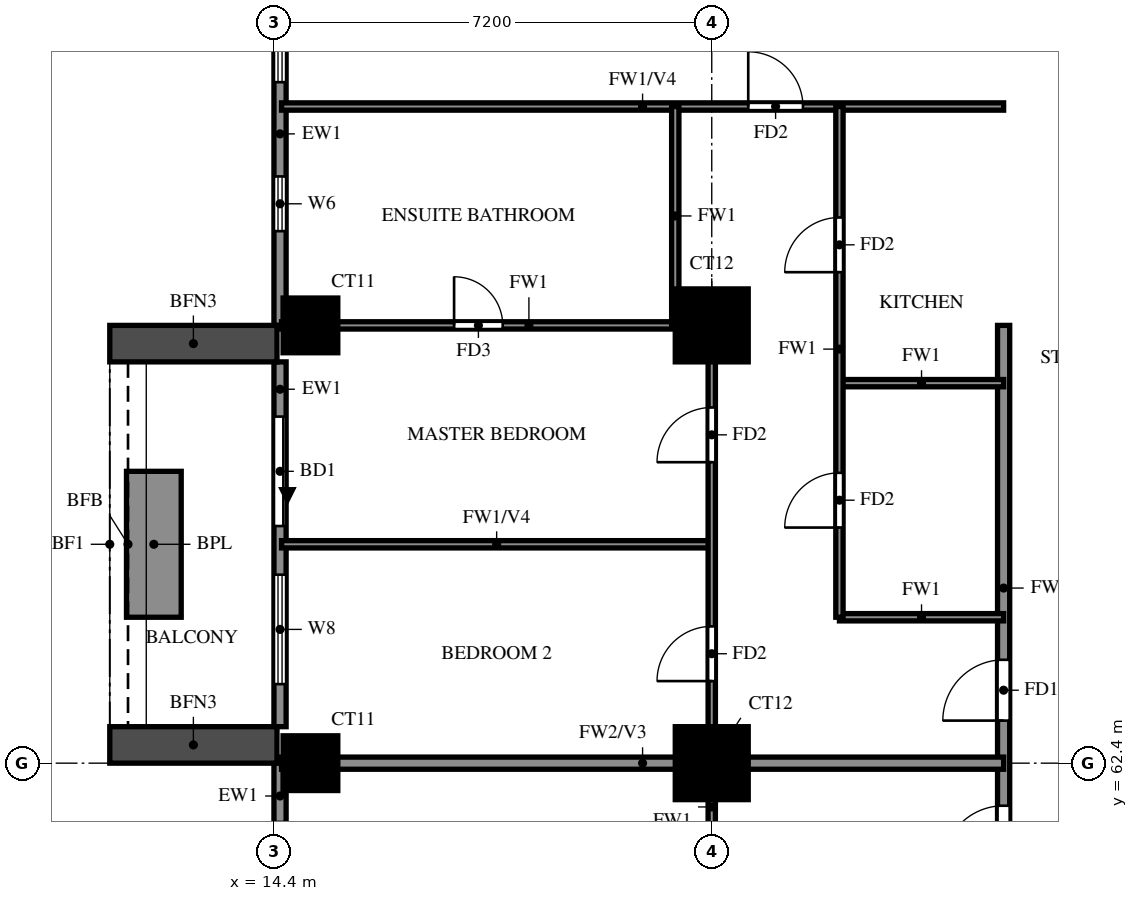
"""IFC4 building model, lengths in metres.
Left out: names, types, materials, properties, quantities, classifications, styles, units other than length and angle.
Written with IfcOpenShell. Run it as: python <this file> out.ifc"""

import sys

from ifc_helpers import new_model, si_unit, direction, frame, frame_2d, origin, origin_2d, place, context, subcontext, project, spatial, rectangle, extrude, source, transform, mapped, element, fill, save


model = new_model("IFC4")
c1 = context("Model", 3, precision=1e-05, world=origin(), true_north=direction((0.0, 1.0)))
c2 = subcontext(c1, "Body", "Model", "MODEL_VIEW")
j1 = project(units=[si_unit("LENGTHUNIT", "METRE"), si_unit("PLANEANGLEUNIT", "RADIAN")], contexts=[c1])
p1 = place(None, origin())
s1 = spatial("IfcSite", under=j1, at=p1, CompositionType="ELEMENT")
p2 = place(p1, origin())
s2 = spatial("IfcBuilding", under=s1, at=p2, CompositionType="ELEMENT")
p3 = place(p2, frame((0.0, 0.0, 100.5)))
s3 = spatial("IfcBuildingStorey", under=s2, at=p3, CompositionType="ELEMENT", Elevation=100.5)
m1 = source(origin(), c2, "Body", "SweptSolid", [
    extrude(rectangle(XDim=0.9, YDim=0.9, at=origin_2d()), origin(), (0.0, 0.0, 1.0), 3.18),
])
p4 = place(p3, frame((15.0, 62.4, 0.0), z_axis=(0.0, 0.0, 1.0), x_axis=(1.0, 0.0, 0.0)))
e1 = element("IfcColumn", 1, at=p4, inside=s3, PredefinedType="COLUMN", context=c2, shape_type="MappedRepresentation", body=[
    mapped(m1, transform((0.0, 0.0, 0.0))),
])
m2 = source(origin(), c2, "Body", "SweptSolid", [
    extrude(rectangle(XDim=1.2, YDim=1.2, at=origin_2d()), origin(), (0.0, 0.0, 1.0), 3.18),
])
p5 = place(p3, frame((21.6, 62.4, 0.0), z_axis=(0.0, 0.0, 1.0), x_axis=(1.0, 0.0, 0.0)))
e2 = element("IfcColumn", 2, at=p5, inside=s3, PredefinedType="COLUMN", context=c2, shape_type="MappedRepresentation", body=[
    mapped(m2, transform((0.0, 0.0, 0.0))),
])
p6 = place(p3, frame((15.0, 69.6, 0.0), z_axis=(0.0, 0.0, 1.0), x_axis=(1.0, 0.0, 0.0)))
e3 = element("IfcColumn", 3, at=p6, inside=s3, PredefinedType="COLUMN", context=c2, shape_type="MappedRepresentation", body=[
    mapped(m1, transform((0.0, 0.0, 0.0))),
])
p7 = place(p3, frame((21.6, 69.6, 0.0), z_axis=(0.0, 0.0, 1.0), x_axis=(1.0, 0.0, 0.0)))
e4 = element("IfcColumn", 4, at=p7, inside=s3, PredefinedType="COLUMN", context=c2, shape_type="MappedRepresentation", body=[
    mapped(m2, transform((0.0, 0.0, 0.0))),
])
p8 = place(p3, frame((14.5, 76.6, 0.0), z_axis=(0.0, 0.0, 1.0), x_axis=(0.0, -1.0, 0.0)))
e5 = element("IfcWall", 5, at=p8, inside=s3, PredefinedType="SOLIDWALL", context=c2, shape_type="SweptSolid", body=[
    extrude(rectangle(XDim=7.0, YDim=0.2, at=frame_2d((3.5, 0.0))), origin(), (0.0, 0.0, 1.0), 3.18),
])
p9 = place(p8, frame((4.55, 0.0, 1.5)))
e6 = element("IfcOpeningElement", 6, at=p9, cuts=e5, PredefinedType="OPENING", context=c2, shape_type="SweptSolid", body=[
    extrude(rectangle(XDim=0.9, YDim=0.9, at=frame_2d((0.45, 0.45))), frame((0.0, 0.11, 0.0), z_axis=(0.0, -1.0, 0.0), x_axis=(1.0, 0.0, 0.0)), (0.0, 0.0, 1.0), 0.22),
])
p10 = place(p8, frame((0.6, 0.0, 0.6)))
e7 = element("IfcOpeningElement", 7, at=p10, cuts=e5, PredefinedType="OPENING", context=c2, shape_type="SweptSolid", body=[
    extrude(rectangle(XDim=2.4, YDim=2.4, at=frame_2d((1.2, 1.2))), frame((0.0, 0.11, 0.0), z_axis=(0.0, -1.0, 0.0), x_axis=(1.0, 0.0, 0.0)), (0.0, 0.0, 1.0), 0.22),
])
p11 = place(p3, frame((14.5, 69.0, 0.0), z_axis=(0.0, 0.0, 1.0), x_axis=(0.0, -1.0, 0.0)))
e8 = element("IfcWall", 8, at=p11, inside=s3, PredefinedType="SOLIDWALL", context=c2, shape_type="SweptSolid", body=[
    extrude(rectangle(XDim=6.0, YDim=0.2, at=frame_2d((3.0, 0.0))), origin(), (0.0, 0.0, 1.0), 3.18),
])
p12 = place(p11, frame((0.9, 0.0, 0.0)))
e9 = element("IfcOpeningElement", 9, at=p12, cuts=e8, PredefinedType="OPENING", context=c2, shape_type="SweptSolid", body=[
    extrude(rectangle(XDim=1.8, YDim=2.4, at=frame_2d((0.9, 1.2))), frame((0.0, 0.11, 0.0), z_axis=(0.0, -1.0, 0.0), x_axis=(1.0, 0.0, 0.0)), (0.0, 0.0, 1.0), 0.22),
])
p13 = place(p11, frame((3.5, 0.0, 0.6)))
e10 = element("IfcOpeningElement", 10, at=p13, cuts=e8, PredefinedType="OPENING", context=c2, shape_type="SweptSolid", body=[
    extrude(rectangle(XDim=1.8, YDim=2.4, at=frame_2d((0.9, 1.2))), frame((0.0, 0.11, 0.0), z_axis=(0.0, -1.0, 0.0), x_axis=(1.0, 0.0, 0.0)), (0.0, 0.0, 1.0), 0.22),
])
p14 = place(p3, frame((14.5, 62.4, 0.0), z_axis=(0.0, 0.0, 1.0), x_axis=(0.0, -1.0, 0.0)))
e11 = element("IfcWall", 11, at=p14, inside=s3, PredefinedType="SOLIDWALL", context=c2, shape_type="SweptSolid", body=[
    extrude(rectangle(XDim=7.2, YDim=0.2, at=frame_2d((3.6, 0.0))), origin(), (0.0, 0.0, 1.0), 3.18),
])
p15 = place(p14, frame((0.967, 0.0, 0.6)))
e12 = element("IfcOpeningElement", 12, at=p15, cuts=e11, PredefinedType="OPENING", context=c2, shape_type="SweptSolid", body=[
    extrude(rectangle(XDim=2.4, YDim=2.4, at=frame_2d((1.2, 1.2))), frame((0.0, 0.11, 0.0), z_axis=(0.0, -1.0, 0.0), x_axis=(1.0, 0.0, 0.0)), (0.0, 0.0, 1.0), 0.22),
])
p16 = place(p14, frame((3.833, 0.0, 0.6)))
e13 = element("IfcOpeningElement", 13, at=p16, cuts=e11, PredefinedType="OPENING", context=c2, shape_type="SweptSolid", body=[
    extrude(rectangle(XDim=2.4, YDim=2.4, at=frame_2d((1.2, 1.2))), frame((0.0, 0.11, 0.0), z_axis=(0.0, -1.0, 0.0), x_axis=(1.0, 0.0, 0.0)), (0.0, 0.0, 1.0), 0.22),
])
for number, where, z_axis, x_axis in (
    (14, (14.45, 69.3, 0.0), (0.0, 0.0, 1.0), (-1.0, 0.0, 0.0)),
    (15, (14.45, 62.7, 0.0), (0.0, 0.0, 1.0), (-1.0, 0.0, 0.0)),
):
    element("IfcWall", number, at=place(p3, frame(where, z_axis=z_axis, x_axis=x_axis)), inside=s3, PredefinedType="SOLIDWALL", context=c2, shape_type="SweptSolid", body=[
        extrude(rectangle(XDim=2.75, YDim=0.6, at=frame_2d((1.375, 0.0))), origin(), (0.0, 0.0, 1.0), 2.85),
    ])
p17 = place(p3, frame((12.425, 67.2, 0.0), z_axis=(0.0, 0.0, 1.0), x_axis=(0.0, -1.0, 0.0)))
e16 = element("IfcWall", 16, at=p17, inside=s3, PredefinedType="SOLIDWALL", context=c2, shape_type="SweptSolid", body=[
    extrude(rectangle(XDim=2.4, YDim=0.9, at=frame_2d((1.2, 0.0))), origin(), (0.0, 0.0, 1.0), 0.9),
])
p18 = place(p3, frame((26.4, 60.0, 0.0), z_axis=(0.0, 0.0, 1.0), x_axis=(0.0, 1.0, 0.0)))
e17 = element("IfcWall", 17, at=p18, inside=s3, PredefinedType="SOLIDWALL", context=c2, shape_type="SweptSolid", body=[
    extrude(rectangle(XDim=9.6, YDim=0.2, at=frame_2d((4.8, 0.0))), origin(), (0.0, 0.0, 1.0), 3.18),
])
p19 = place(p18, frame((0.7, 0.0, 0.0)))
e18 = element("IfcOpeningElement", 18, at=p19, cuts=e17, PredefinedType="OPENING", context=c2, shape_type="SweptSolid", body=[
    extrude(rectangle(XDim=1.0, YDim=2.1, at=frame_2d((0.5, 1.05))), frame((0.0, 0.11, 0.0), z_axis=(0.0, -1.0, 0.0), x_axis=(1.0, 0.0, 0.0)), (0.0, 0.0, 1.0), 0.22),
])
p20 = place(p18, frame((3.1, 0.0, 0.0)))
e19 = element("IfcOpeningElement", 19, at=p20, cuts=e17, PredefinedType="OPENING", context=c2, shape_type="SweptSolid", body=[
    extrude(rectangle(XDim=1.0, YDim=2.1, at=frame_2d((0.5, 1.05))), frame((0.0, 0.11, 0.0), z_axis=(0.0, -1.0, 0.0), x_axis=(1.0, 0.0, 0.0)), (0.0, 0.0, 1.0), 0.22),
])
p21 = place(p3, frame((14.525, 62.4, 0.0), z_axis=(0.0, 0.0, 1.0), x_axis=(1.0, 0.0, 0.0)))
e20 = element("IfcWall", 20, at=p21, inside=s3, PredefinedType="SOLIDWALL", context=c2, shape_type="SweptSolid", body=[
    extrude(rectangle(XDim=11.875, YDim=0.2, at=frame_2d((5.938, 0.0))), origin(), (0.0, 0.0, 1.0), 3.18),
])
p22 = place(p3, frame((23.7, 64.8, 0.0), z_axis=(0.0, 0.0, 1.0), x_axis=(1.0, 0.0, 0.0)))
e21 = element("IfcWall", 21, at=p22, inside=s3, PredefinedType="PARTITIONING", context=c2, shape_type="SweptSolid", body=[
    extrude(rectangle(XDim=2.7, YDim=0.12, at=frame_2d((1.35, 0.0))), origin(), (0.0, 0.0, 1.0), 3.18),
])
p23 = place(p3, frame((14.525, 66.0, 0.0), z_axis=(0.0, 0.0, 1.0), x_axis=(1.0, 0.0, 0.0)))
e22 = element("IfcWall", 22, at=p23, inside=s3, PredefinedType="PARTITIONING", context=c2, shape_type="SweptSolid", body=[
    extrude(rectangle(XDim=7.075, YDim=0.12, at=frame_2d((3.538, 0.0))), origin(), (0.0, 0.0, 1.0), 2.28),
])
p24 = place(p3, frame((23.7, 68.65, 0.0), z_axis=(0.0, 0.0, 1.0), x_axis=(1.0, 0.0, 0.0)))
e23 = element("IfcWall", 23, at=p24, inside=s3, PredefinedType="PARTITIONING", context=c2, shape_type="SweptSolid", body=[
    extrude(rectangle(XDim=2.7, YDim=0.12, at=frame_2d((1.35, 0.0))), origin(), (0.0, 0.0, 1.0), 3.18),
])
p25 = place(p3, frame((14.525, 69.6, 0.0), z_axis=(0.0, 0.0, 1.0), x_axis=(1.0, 0.0, 0.0)))
e24 = element("IfcWall", 24, at=p25, inside=s3, PredefinedType="PARTITIONING", context=c2, shape_type="SweptSolid", body=[
    extrude(rectangle(XDim=7.075, YDim=0.12, at=frame_2d((3.538, 0.0))), origin(), (0.0, 0.0, 1.0), 3.18),
])
p26 = place(p25, frame((2.837, 0.0, 0.0)))
e25 = element("IfcOpeningElement", 25, at=p26, cuts=e24, PredefinedType="OPENING", context=c2, shape_type="SweptSolid", body=[
    extrude(rectangle(XDim=0.8, YDim=2.1, at=frame_2d((0.4, 1.05))), frame((0.0, 0.07, 0.0), z_axis=(0.0, -1.0, 0.0), x_axis=(1.0, 0.0, 0.0)), (0.0, 0.0, 1.0), 0.14),
])
p27 = place(p3, frame((14.525, 73.2, 0.0), z_axis=(0.0, 0.0, 1.0), x_axis=(1.0, 0.0, 0.0)))
e26 = element("IfcWall", 26, at=p27, inside=s3, PredefinedType="PARTITIONING", context=c2, shape_type="SweptSolid", body=[
    extrude(rectangle(XDim=11.875, YDim=0.12, at=frame_2d((5.938, 0.0))), origin(), (0.0, 0.0, 1.0), 2.28),
])
p28 = place(p27, frame((7.675, 0.0, 0.0)))
e27 = element("IfcOpeningElement", 27, at=p28, cuts=e26, PredefinedType="OPENING", context=c2, shape_type="SweptSolid", body=[
    extrude(rectangle(XDim=0.9, YDim=2.1, at=frame_2d((0.45, 1.05))), frame((0.0, 0.07, 0.0), z_axis=(0.0, -1.0, 0.0), x_axis=(1.0, 0.0, 0.0)), (0.0, 0.0, 1.0), 0.14),
])
p29 = place(p3, frame((21.0, 69.6, 0.0), z_axis=(0.0, 0.0, 1.0), x_axis=(0.0, 1.0, 0.0)))
e28 = element("IfcWall", 28, at=p29, inside=s3, PredefinedType="PARTITIONING", context=c2, shape_type="SweptSolid", body=[
    extrude(rectangle(XDim=3.6, YDim=0.12, at=frame_2d((1.8, 0.0))), origin(), (0.0, 0.0, 1.0), 3.18),
])
p30 = place(p3, frame((21.6, 55.2, 0.0), z_axis=(0.0, 0.0, 1.0), x_axis=(0.0, 1.0, 0.0)))
e29 = element("IfcWall", 29, at=p30, inside=s3, PredefinedType="PARTITIONING", context=c2, shape_type="SweptSolid", body=[
    extrude(rectangle(XDim=14.4, YDim=0.12, at=frame_2d((7.2, 0.0))), origin(), (0.0, 0.0, 1.0), 3.18),
])
p31 = place(p30, frame((2.85, 0.0, 0.0)))
e30 = element("IfcOpeningElement", 30, at=p31, cuts=e29, PredefinedType="OPENING", context=c2, shape_type="SweptSolid", body=[
    extrude(rectangle(XDim=1.5, YDim=2.1, at=frame_2d((0.75, 1.05))), frame((0.0, 0.07, 0.0), z_axis=(0.0, -1.0, 0.0), x_axis=(1.0, 0.0, 0.0)), (0.0, 0.0, 1.0), 0.14),
])
p32 = place(p30, frame((8.55, 0.0, 0.0)))
e31 = element("IfcOpeningElement", 31, at=p32, cuts=e29, PredefinedType="OPENING", context=c2, shape_type="SweptSolid", body=[
    extrude(rectangle(XDim=0.9, YDim=2.1, at=frame_2d((0.45, 1.05))), frame((0.0, 0.07, 0.0), z_axis=(0.0, -1.0, 0.0), x_axis=(1.0, 0.0, 0.0)), (0.0, 0.0, 1.0), 0.14),
])
p33 = place(p30, frame((12.15, 0.0, 0.0)))
e32 = element("IfcOpeningElement", 32, at=p33, cuts=e29, PredefinedType="OPENING", context=c2, shape_type="SweptSolid", body=[
    extrude(rectangle(XDim=0.9, YDim=2.1, at=frame_2d((0.45, 1.05))), frame((0.0, 0.07, 0.0), z_axis=(0.0, -1.0, 0.0), x_axis=(1.0, 0.0, 0.0)), (0.0, 0.0, 1.0), 0.14),
])
p34 = place(p3, frame((23.7, 64.8, 0.0), z_axis=(0.0, 0.0, 1.0), x_axis=(0.0, 1.0, 0.0)))
e33 = element("IfcWall", 33, at=p34, inside=s3, PredefinedType="PARTITIONING", context=c2, shape_type="SweptSolid", body=[
    extrude(rectangle(XDim=8.4, YDim=0.12, at=frame_2d((4.2, 0.0))), origin(), (0.0, 0.0, 1.0), 3.18),
])
p35 = place(p34, frame((1.475, 0.0, 0.0)))
e34 = element("IfcOpeningElement", 34, at=p35, cuts=e33, PredefinedType="OPENING", context=c2, shape_type="SweptSolid", body=[
    extrude(rectangle(XDim=0.9, YDim=2.1, at=frame_2d((0.45, 1.05))), frame((0.0, 0.07, 0.0), z_axis=(0.0, -1.0, 0.0), x_axis=(1.0, 0.0, 0.0)), (0.0, 0.0, 1.0), 0.14),
])
p36 = place(p34, frame((5.675, 0.0, 0.0)))
e35 = element("IfcOpeningElement", 35, at=p36, cuts=e33, PredefinedType="OPENING", context=c2, shape_type="SweptSolid", body=[
    extrude(rectangle(XDim=0.9, YDim=2.1, at=frame_2d((0.45, 1.05))), frame((0.0, 0.07, 0.0), z_axis=(0.0, -1.0, 0.0), x_axis=(1.0, 0.0, 0.0)), (0.0, 0.0, 1.0), 0.14),
])
p37 = place(p9, origin())
e36 = element("IfcWindow", 36, at=p37, inside=s3, PartitioningType="SINGLE_PANEL", PredefinedType="WINDOW", context=c2, shape_type="SweptSolid", body=[
    extrude(rectangle(XDim=0.9, YDim=0.9, at=frame_2d((0.45, 0.45))), frame((0.0, 0.03, 0.0), z_axis=(0.0, -1.0, 0.0), x_axis=(1.0, 0.0, 0.0)), (0.0, 0.0, 1.0), 0.06),
])
fill(e6, e36)
p38 = place(p10, origin())
e37 = element("IfcWindow", 37, at=p38, inside=s3, PartitioningType="DOUBLE_PANEL_VERTICAL", PredefinedType="WINDOW", context=c2, shape_type="SweptSolid", body=[
    extrude(rectangle(XDim=2.4, YDim=2.4, at=frame_2d((1.2, 1.2))), frame((0.0, 0.03, 0.0), z_axis=(0.0, -1.0, 0.0), x_axis=(1.0, 0.0, 0.0)), (0.0, 0.0, 1.0), 0.06),
])
fill(e7, e37)
p39 = place(p12, origin())
e38 = element("IfcDoor", 38, at=p39, inside=s3, OperationType="DOUBLE_DOOR_SLIDING", PredefinedType="DOOR", context=c2, shape_type="SweptSolid", body=[
    extrude(rectangle(XDim=1.8, YDim=2.4, at=frame_2d((0.9, 1.2))), frame((0.0, 0.025, 0.0), z_axis=(0.0, -1.0, 0.0), x_axis=(1.0, 0.0, 0.0)), (0.0, 0.0, 1.0), 0.05),
])
fill(e9, e38)
p40 = place(p13, origin())
e39 = element("IfcWindow", 39, at=p40, inside=s3, PartitioningType="DOUBLE_PANEL_VERTICAL", PredefinedType="WINDOW", context=c2, shape_type="SweptSolid", body=[
    extrude(rectangle(XDim=1.8, YDim=2.4, at=frame_2d((0.9, 1.2))), frame((0.0, 0.03, 0.0), z_axis=(0.0, -1.0, 0.0), x_axis=(1.0, 0.0, 0.0)), (0.0, 0.0, 1.0), 0.06),
])
fill(e10, e39)
p41 = place(p19, origin())
e40 = element("IfcDoor", 40, at=p41, inside=s3, OperationType="SINGLE_SWING_LEFT", PredefinedType="DOOR", context=c2, shape_type="SweptSolid", body=[
    extrude(rectangle(XDim=1.0, YDim=2.1, at=frame_2d((0.5, 1.05))), frame((0.0, 0.025, 0.0), z_axis=(0.0, -1.0, 0.0), x_axis=(1.0, 0.0, 0.0)), (0.0, 0.0, 1.0), 0.05),
])
fill(e18, e40)
p42 = place(p20, origin())
e41 = element("IfcDoor", 41, at=p42, inside=s3, OperationType="SINGLE_SWING_LEFT", PredefinedType="DOOR", context=c2, shape_type="SweptSolid", body=[
    extrude(rectangle(XDim=1.0, YDim=2.1, at=frame_2d((0.5, 1.05))), frame((0.0, 0.025, 0.0), z_axis=(0.0, -1.0, 0.0), x_axis=(1.0, 0.0, 0.0)), (0.0, 0.0, 1.0), 0.05),
])
fill(e19, e41)
p43 = place(p32, origin())
e42 = element("IfcDoor", 42, at=p43, inside=s3, OperationType="SINGLE_SWING_RIGHT", PredefinedType="DOOR", context=c2, shape_type="SweptSolid", body=[
    extrude(rectangle(XDim=0.9, YDim=2.1, at=frame_2d((0.45, 1.05))), frame((0.0, 0.025, 0.0), z_axis=(0.0, -1.0, 0.0), x_axis=(1.0, 0.0, 0.0)), (0.0, 0.0, 1.0), 0.05),
])
fill(e31, e42)
p44 = place(p33, origin())
e43 = element("IfcDoor", 43, at=p44, inside=s3, OperationType="SINGLE_SWING_LEFT", PredefinedType="DOOR", context=c2, shape_type="SweptSolid", body=[
    extrude(rectangle(XDim=0.9, YDim=2.1, at=frame_2d((0.45, 1.05))), frame((0.0, 0.025, 0.0), z_axis=(0.0, -1.0, 0.0), x_axis=(1.0, 0.0, 0.0)), (0.0, 0.0, 1.0), 0.05),
])
fill(e32, e43)
p45 = place(p26, origin())
e44 = element("IfcDoor", 44, at=p45, inside=s3, OperationType="SINGLE_SWING_LEFT", PredefinedType="DOOR", context=c2, shape_type="SweptSolid", body=[
    extrude(rectangle(XDim=0.8, YDim=2.1, at=frame_2d((0.4, 1.05))), frame((0.0, 0.025, 0.0), z_axis=(0.0, -1.0, 0.0), x_axis=(1.0, 0.0, 0.0)), (0.0, 0.0, 1.0), 0.05),
])
fill(e25, e44)
p46 = place(p28, origin())
e45 = element("IfcDoor", 45, at=p46, inside=s3, OperationType="SINGLE_SWING_RIGHT", PredefinedType="DOOR", context=c2, shape_type="SweptSolid", body=[
    extrude(rectangle(XDim=0.9, YDim=2.1, at=frame_2d((0.45, 1.05))), frame((0.0, 0.025, 0.0), z_axis=(0.0, -1.0, 0.0), x_axis=(1.0, 0.0, 0.0)), (0.0, 0.0, 1.0), 0.05),
])
fill(e27, e45)
p47 = place(p35, origin())
e46 = element("IfcDoor", 46, at=p47, inside=s3, OperationType="SINGLE_SWING_LEFT", PredefinedType="DOOR", context=c2, shape_type="SweptSolid", body=[
    extrude(rectangle(XDim=0.9, YDim=2.1, at=frame_2d((0.45, 1.05))), frame((0.0, 0.025, 0.0), z_axis=(0.0, -1.0, 0.0), x_axis=(1.0, 0.0, 0.0)), (0.0, 0.0, 1.0), 0.05),
])
fill(e34, e46)
p48 = place(p36, origin())
e47 = element("IfcDoor", 47, at=p48, inside=s3, OperationType="SINGLE_SWING_LEFT", PredefinedType="DOOR", context=c2, shape_type="SweptSolid", body=[
    extrude(rectangle(XDim=0.9, YDim=2.1, at=frame_2d((0.45, 1.05))), frame((0.0, 0.025, 0.0), z_axis=(0.0, -1.0, 0.0), x_axis=(1.0, 0.0, 0.0)), (0.0, 0.0, 1.0), 0.05),
])
fill(e35, e47)
save(model, sys.argv[1])
